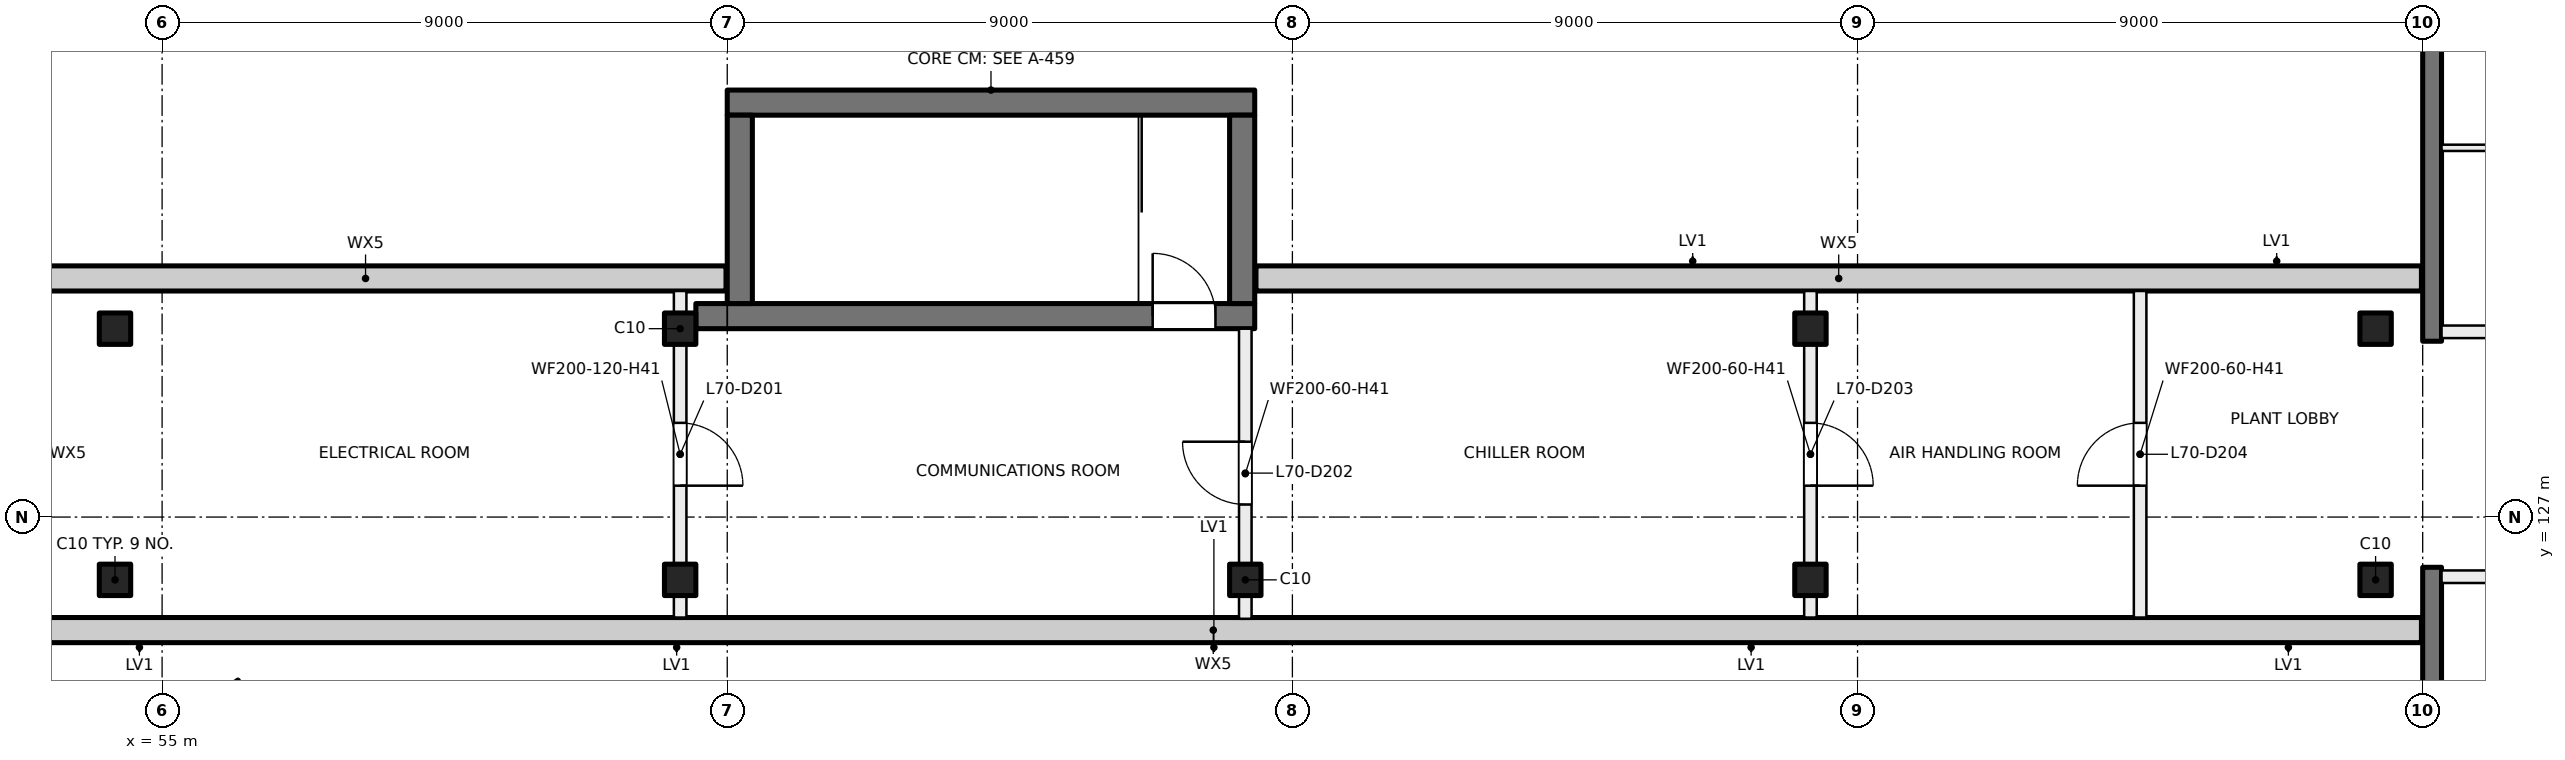
"""IFC4 building model, lengths in metres.
Left out: names, types, materials, properties, quantities, classifications, styles, units other than length and angle.
Written with IfcOpenShell. Run it as: python <this file> out.ifc"""

import sys

from ifc_helpers import new_model, si_unit, direction, frame, frame_2d, origin, origin_2d, place, context, subcontext, project, spatial, rectangle, hollow_rectangle, extrude, element, fill, save


model = new_model("IFC4")
c1 = context("Model", 3, precision=1e-05, world=origin(), true_north=direction((0.0, 1.0)))
c2 = subcontext(c1, "Body", "Model", "MODEL_VIEW")
j1 = project(units=[si_unit("LENGTHUNIT", "METRE"), si_unit("PLANEANGLEUNIT", "RADIAN")], contexts=[c1])
p1 = place(None, origin())
s1 = spatial("IfcSite", under=j1, at=p1, CompositionType="ELEMENT")
p2 = place(p1, origin())
s2 = spatial("IfcBuilding", under=s1, at=p2, CompositionType="ELEMENT")
p3 = place(p2, frame((0.0, 0.0, 295.5)))
s3 = spatial("IfcBuildingStorey", under=s2, at=p3, CompositionType="ELEMENT", Elevation=295.5)
p4 = place(p3, frame((56.036, 123.43, 0.0), z_axis=(0.0, 0.0, 1.0), x_axis=(0.573576436351, -0.819152044289, 0.0)))
e1 = element("IfcColumn", 1, at=p4, inside=s3, PredefinedType="COLUMN", context=c2, shape_type="SweptSolid", body=[
    extrude(hollow_rectangle(XDim=1.4, YDim=1.4, WallThickness=0.025, at=origin_2d()), origin(), (0.0, 0.0, 1.0), 4.5),
])
for number, where, z_axis, x_axis in (
    (2, (54.25, 130.0, 0.0), (0.0, 0.0, 1.0), (1.0, 0.0, 0.0)),
    (3, (63.25, 130.0, 0.0), (0.0, 0.0, 1.0), (1.0, 0.0, 0.0)),
    (4, (81.25, 130.0, 0.0), (0.0, 0.0, 1.0), (1.0, 0.0, 0.0)),
    (5, (90.25, 130.0, 0.0), (0.0, 0.0, 1.0), (1.0, 0.0, 0.0)),
    (6, (54.25, 126.0, 0.0), (0.0, 0.0, 1.0), (1.0, 0.0, 0.0)),
    (7, (63.25, 126.0, 0.0), (0.0, 0.0, 1.0), (1.0, 0.0, 0.0)),
    (8, (72.25, 126.0, 0.0), (0.0, 0.0, 1.0), (1.0, 0.0, 0.0)),
    (9, (81.25, 126.0, 0.0), (0.0, 0.0, 1.0), (1.0, 0.0, 0.0)),
    (10, (90.25, 126.0, 0.0), (0.0, 0.0, 1.0), (1.0, 0.0, 0.0)),
):
    element("IfcColumn", number, at=place(p3, frame(where, z_axis=z_axis, x_axis=x_axis)), inside=s3, PredefinedType="COLUMN", context=c2, shape_type="SweptSolid", body=[
        extrude(rectangle(XDim=0.5, YDim=0.5, at=origin_2d()), origin(), (0.0, 0.0, 1.0), 4.5),
    ])
for number, where, z_axis, x_axis in (
    (11, (91.15, 138.55, 0.0), (0.0, 0.0, 1.0), (0.0, -1.0, 0.0)),
    (12, (91.15, 126.2, 0.0), (0.0, 0.0, 1.0), (0.0, -1.0, 0.0)),
):
    element("IfcWall", number, at=place(p3, frame(where, z_axis=z_axis, x_axis=x_axis)), inside=s3, PredefinedType="SHEAR", context=c2, shape_type="SweptSolid", body=[
        extrude(rectangle(XDim=8.75, YDim=0.3, at=frame_2d((4.375, 0.0))), origin(), (0.0, 0.0, 1.0), 4.5),
    ])
p5 = place(p3, frame((63.5, 130.2, 0.0), z_axis=(0.0, 0.0, 1.0), x_axis=(1.0, 0.0, 0.0)))
e13 = element("IfcWall", 13, at=p5, inside=s3, PredefinedType="SHEAR", context=c2, shape_type="SweptSolid", body=[
    extrude(rectangle(XDim=8.9, YDim=0.4, at=frame_2d((4.45, 0.0))), origin(), (0.0, 0.0, 1.0), 4.5),
])
p6 = place(p5, frame((7.275, 0.0, 0.0)))
e14 = element("IfcOpeningElement", 14, at=p6, cuts=e13, PredefinedType="OPENING", context=c2, shape_type="SweptSolid", body=[
    extrude(rectangle(XDim=1.0, YDim=2.1, at=frame_2d((0.5, 1.05))), frame((0.0, 0.21, 0.0), z_axis=(0.0, -1.0, 0.0), x_axis=(1.0, 0.0, 0.0)), (0.0, 0.0, 1.0), 0.42),
])
p7 = place(p3, frame((64.0, 133.6, 0.0), z_axis=(0.0, 0.0, 1.0), x_axis=(1.0, 0.0, 0.0)))
e15 = element("IfcWall", 15, at=p7, inside=s3, PredefinedType="SHEAR", context=c2, shape_type="SweptSolid", body=[
    extrude(rectangle(XDim=8.4, YDim=0.4, at=frame_2d((4.2, 0.0))), origin(), (0.0, 0.0, 1.0), 4.5),
])
for number, where, z_axis, x_axis in (
    (16, (64.2, 130.4, 0.0), (0.0, 0.0, 1.0), (0.0, 1.0, 0.0)),
    (17, (72.2, 130.4, 0.0), (0.0, 0.0, 1.0), (0.0, 1.0, 0.0)),
):
    element("IfcWall", number, at=place(p3, frame(where, z_axis=z_axis, x_axis=x_axis)), inside=s3, PredefinedType="SHEAR", context=c2, shape_type="SweptSolid", body=[
        extrude(rectangle(XDim=3.0, YDim=0.4, at=frame_2d((1.5, 0.0))), origin(), (0.0, 0.0, 1.0), 4.5),
    ])
p8 = place(p3, frame((52.5, 130.8, 0.0), z_axis=(0.0, 0.0, 1.0), x_axis=(1.0, 0.0, 0.0)))
e18 = element("IfcWall", 18, at=p8, inside=s3, PredefinedType="SOLIDWALL", context=c2, shape_type="SweptSolid", body=[
    extrude(rectangle(XDim=11.48, YDim=0.4, at=frame_2d((5.74, 0.0))), origin(), (0.0, 0.0, 1.0), 4.125),
])
p9 = place(p3, frame((90.98, 125.2, 0.0), z_axis=(0.0, 0.0, 1.0), x_axis=(-1.0, 0.0, 0.0)))
e19 = element("IfcWall", 19, at=p9, inside=s3, PredefinedType="SOLIDWALL", context=c2, shape_type="SweptSolid", body=[
    extrude(rectangle(XDim=38.48, YDim=0.4, at=frame_2d((19.24, 0.0))), origin(), (0.0, 0.0, 1.0), 4.125),
])
p10 = place(p3, frame((72.42, 130.8, 0.0), z_axis=(0.0, 0.0, 1.0), x_axis=(1.0, 0.0, 0.0)))
e20 = element("IfcWall", 20, at=p10, inside=s3, PredefinedType="SOLIDWALL", context=c2, shape_type="SweptSolid", body=[
    extrude(rectangle(XDim=18.56, YDim=0.4, at=frame_2d((9.28, 0.0))), origin(), (0.0, 0.0, 1.0), 4.125),
])
p11 = place(p3, frame((95.25, 126.05, 0.0), z_axis=(0.0, 0.0, 1.0), x_axis=(-1.0, 0.0, 0.0)))
e21 = element("IfcWall", 21, at=p11, inside=s3, PredefinedType="PARTITIONING", context=c2, shape_type="SweptSolid", body=[
    extrude(rectangle(XDim=3.95, YDim=0.2, at=frame_2d((1.975, 0.0))), origin(), (0.0, 0.0, 1.0), 4.125),
])
p12 = place(p11, frame((0.3, 0.0, 0.0)))
e22 = element("IfcOpeningElement", 22, at=p12, cuts=e21, PredefinedType="OPENING", context=c2, shape_type="SweptSolid", body=[
    extrude(rectangle(XDim=1.2, YDim=2.1, at=frame_2d((0.6, 1.05))), frame((0.0, 0.11, 0.0), z_axis=(0.0, -1.0, 0.0), x_axis=(1.0, 0.0, 0.0)), (0.0, 0.0, 1.0), 0.22),
])
p13 = place(p3, frame((91.3, 129.95, 0.0), z_axis=(0.0, 0.0, 1.0), x_axis=(1.0, 0.0, 0.0)))
e23 = element("IfcWall", 23, at=p13, inside=s3, PredefinedType="PARTITIONING", context=c2, shape_type="SweptSolid", body=[
    extrude(rectangle(XDim=3.95, YDim=0.2, at=frame_2d((1.975, 0.0))), origin(), (0.0, 0.0, 1.0), 4.125),
])
p14 = place(p13, frame((2.45, 0.0, 0.0)))
e24 = element("IfcOpeningElement", 24, at=p14, cuts=e23, PredefinedType="OPENING", context=c2, shape_type="SweptSolid", body=[
    extrude(rectangle(XDim=1.2, YDim=2.1, at=frame_2d((0.6, 1.05))), frame((0.0, 0.11, 0.0), z_axis=(0.0, -1.0, 0.0), x_axis=(1.0, 0.0, 0.0)), (0.0, 0.0, 1.0), 0.22),
])
p15 = place(p3, frame((91.3, 132.88, 0.0), z_axis=(0.0, 0.0, 1.0), x_axis=(1.0, 0.0, 0.0)))
e25 = element("IfcWall", 25, at=p15, inside=s3, PredefinedType="PARTITIONING", context=c2, shape_type="SweptSolid", body=[
    extrude(rectangle(XDim=2.1, YDim=0.1, at=frame_2d((1.05, 0.0))), origin(), (0.0, 0.0, 1.0), 4.125),
])
p16 = place(p3, frame((63.25, 130.6, 0.0), z_axis=(0.0, 0.0, 1.0), x_axis=(0.0, -1.0, 0.0)))
e26 = element("IfcWall", 26, at=p16, inside=s3, PredefinedType="PARTITIONING", context=c2, shape_type="SweptSolid", body=[
    extrude(rectangle(XDim=5.2, YDim=0.2, at=frame_2d((2.6, 0.0))), origin(), (0.0, 0.0, 1.0), 4.125),
])
p17 = place(p16, frame((2.1, 0.0, 0.0)))
e27 = element("IfcOpeningElement", 27, at=p17, cuts=e26, PredefinedType="OPENING", context=c2, shape_type="SweptSolid", body=[
    extrude(rectangle(XDim=1.0, YDim=2.1, at=frame_2d((0.5, 1.05))), frame((0.0, 0.11, 0.0), z_axis=(0.0, -1.0, 0.0), x_axis=(1.0, 0.0, 0.0)), (0.0, 0.0, 1.0), 0.22),
])
p18 = place(p3, frame((72.25, 130.0, 0.0), z_axis=(0.0, 0.0, 1.0), x_axis=(0.0, -1.0, 0.0)))
e28 = element("IfcWall", 28, at=p18, inside=s3, PredefinedType="PARTITIONING", context=c2, shape_type="SweptSolid", body=[
    extrude(rectangle(XDim=4.62, YDim=0.2, at=frame_2d((2.31, 0.0))), origin(), (0.0, 0.0, 1.0), 4.125),
])
p19 = place(p18, frame((1.8, 0.0, 0.0)))
e29 = element("IfcOpeningElement", 29, at=p19, cuts=e28, PredefinedType="OPENING", context=c2, shape_type="SweptSolid", body=[
    extrude(rectangle(XDim=1.0, YDim=2.1, at=frame_2d((0.5, 1.05))), frame((0.0, 0.11, 0.0), z_axis=(0.0, -1.0, 0.0), x_axis=(1.0, 0.0, 0.0)), (0.0, 0.0, 1.0), 0.22),
])
p20 = place(p3, frame((81.25, 130.6, 0.0), z_axis=(0.0, 0.0, 1.0), x_axis=(0.0, -1.0, 0.0)))
e30 = element("IfcWall", 30, at=p20, inside=s3, PredefinedType="PARTITIONING", context=c2, shape_type="SweptSolid", body=[
    extrude(rectangle(XDim=5.2, YDim=0.2, at=frame_2d((2.6, 0.0))), origin(), (0.0, 0.0, 1.0), 4.125),
])
p21 = place(p20, frame((2.1, 0.0, 0.0)))
e31 = element("IfcOpeningElement", 31, at=p21, cuts=e30, PredefinedType="OPENING", context=c2, shape_type="SweptSolid", body=[
    extrude(rectangle(XDim=1.0, YDim=2.1, at=frame_2d((0.5, 1.05))), frame((0.0, 0.11, 0.0), z_axis=(0.0, -1.0, 0.0), x_axis=(1.0, 0.0, 0.0)), (0.0, 0.0, 1.0), 0.22),
])
p22 = place(p3, frame((86.5, 125.4, 0.0), z_axis=(0.0, 0.0, 1.0), x_axis=(0.0, 1.0, 0.0)))
e32 = element("IfcWall", 32, at=p22, inside=s3, PredefinedType="PARTITIONING", context=c2, shape_type="SweptSolid", body=[
    extrude(rectangle(XDim=5.2, YDim=0.2, at=frame_2d((2.6, 0.0))), origin(), (0.0, 0.0, 1.0), 4.125),
])
p23 = place(p22, frame((2.1, 0.0, 0.0)))
e33 = element("IfcOpeningElement", 33, at=p23, cuts=e32, PredefinedType="OPENING", context=c2, shape_type="SweptSolid", body=[
    extrude(rectangle(XDim=1.0, YDim=2.1, at=frame_2d((0.5, 1.05))), frame((0.0, 0.11, 0.0), z_axis=(0.0, -1.0, 0.0), x_axis=(1.0, 0.0, 0.0)), (0.0, 0.0, 1.0), 0.22),
])
p24 = place(p6, origin())
e34 = element("IfcDoor", 34, at=p24, inside=s3, OperationType="SINGLE_SWING_LEFT", PredefinedType="DOOR", context=c2, shape_type="SweptSolid", body=[
    extrude(rectangle(XDim=1.0, YDim=2.1, at=frame_2d((0.5, 1.05))), frame((0.0, 0.025, 0.0), z_axis=(0.0, -1.0, 0.0), x_axis=(1.0, 0.0, 0.0)), (0.0, 0.0, 1.0), 0.05),
])
fill(e14, e34)
p25 = place(p17, origin())
e35 = element("IfcDoor", 35, at=p25, inside=s3, OperationType="SINGLE_SWING_RIGHT", PredefinedType="DOOR", context=c2, shape_type="SweptSolid", body=[
    extrude(rectangle(XDim=1.0, YDim=2.1, at=frame_2d((0.5, 1.05))), frame((0.0, 0.025, 0.0), z_axis=(0.0, -1.0, 0.0), x_axis=(1.0, 0.0, 0.0)), (0.0, 0.0, 1.0), 0.05),
])
fill(e27, e35)
p26 = place(p19, origin())
e36 = element("IfcDoor", 36, at=p26, inside=s3, OperationType="SINGLE_SWING_LEFT", PredefinedType="DOOR", context=c2, shape_type="SweptSolid", body=[
    extrude(rectangle(XDim=1.0, YDim=2.1, at=frame_2d((0.5, 1.05))), frame((0.0, 0.025, 0.0), z_axis=(0.0, -1.0, 0.0), x_axis=(1.0, 0.0, 0.0)), (0.0, 0.0, 1.0), 0.05),
])
fill(e29, e36)
p27 = place(p21, origin())
e37 = element("IfcDoor", 37, at=p27, inside=s3, OperationType="SINGLE_SWING_RIGHT", PredefinedType="DOOR", context=c2, shape_type="SweptSolid", body=[
    extrude(rectangle(XDim=1.0, YDim=2.1, at=frame_2d((0.5, 1.05))), frame((0.0, 0.025, 0.0), z_axis=(0.0, -1.0, 0.0), x_axis=(1.0, 0.0, 0.0)), (0.0, 0.0, 1.0), 0.05),
])
fill(e31, e37)
p28 = place(p23, origin())
e38 = element("IfcDoor", 38, at=p28, inside=s3, OperationType="SINGLE_SWING_LEFT", PredefinedType="DOOR", context=c2, shape_type="SweptSolid", body=[
    extrude(rectangle(XDim=1.0, YDim=2.1, at=frame_2d((0.5, 1.05))), frame((0.0, 0.025, 0.0), z_axis=(0.0, -1.0, 0.0), x_axis=(1.0, 0.0, 0.0)), (0.0, 0.0, 1.0), 0.05),
])
fill(e33, e38)
save(model, sys.argv[1])
